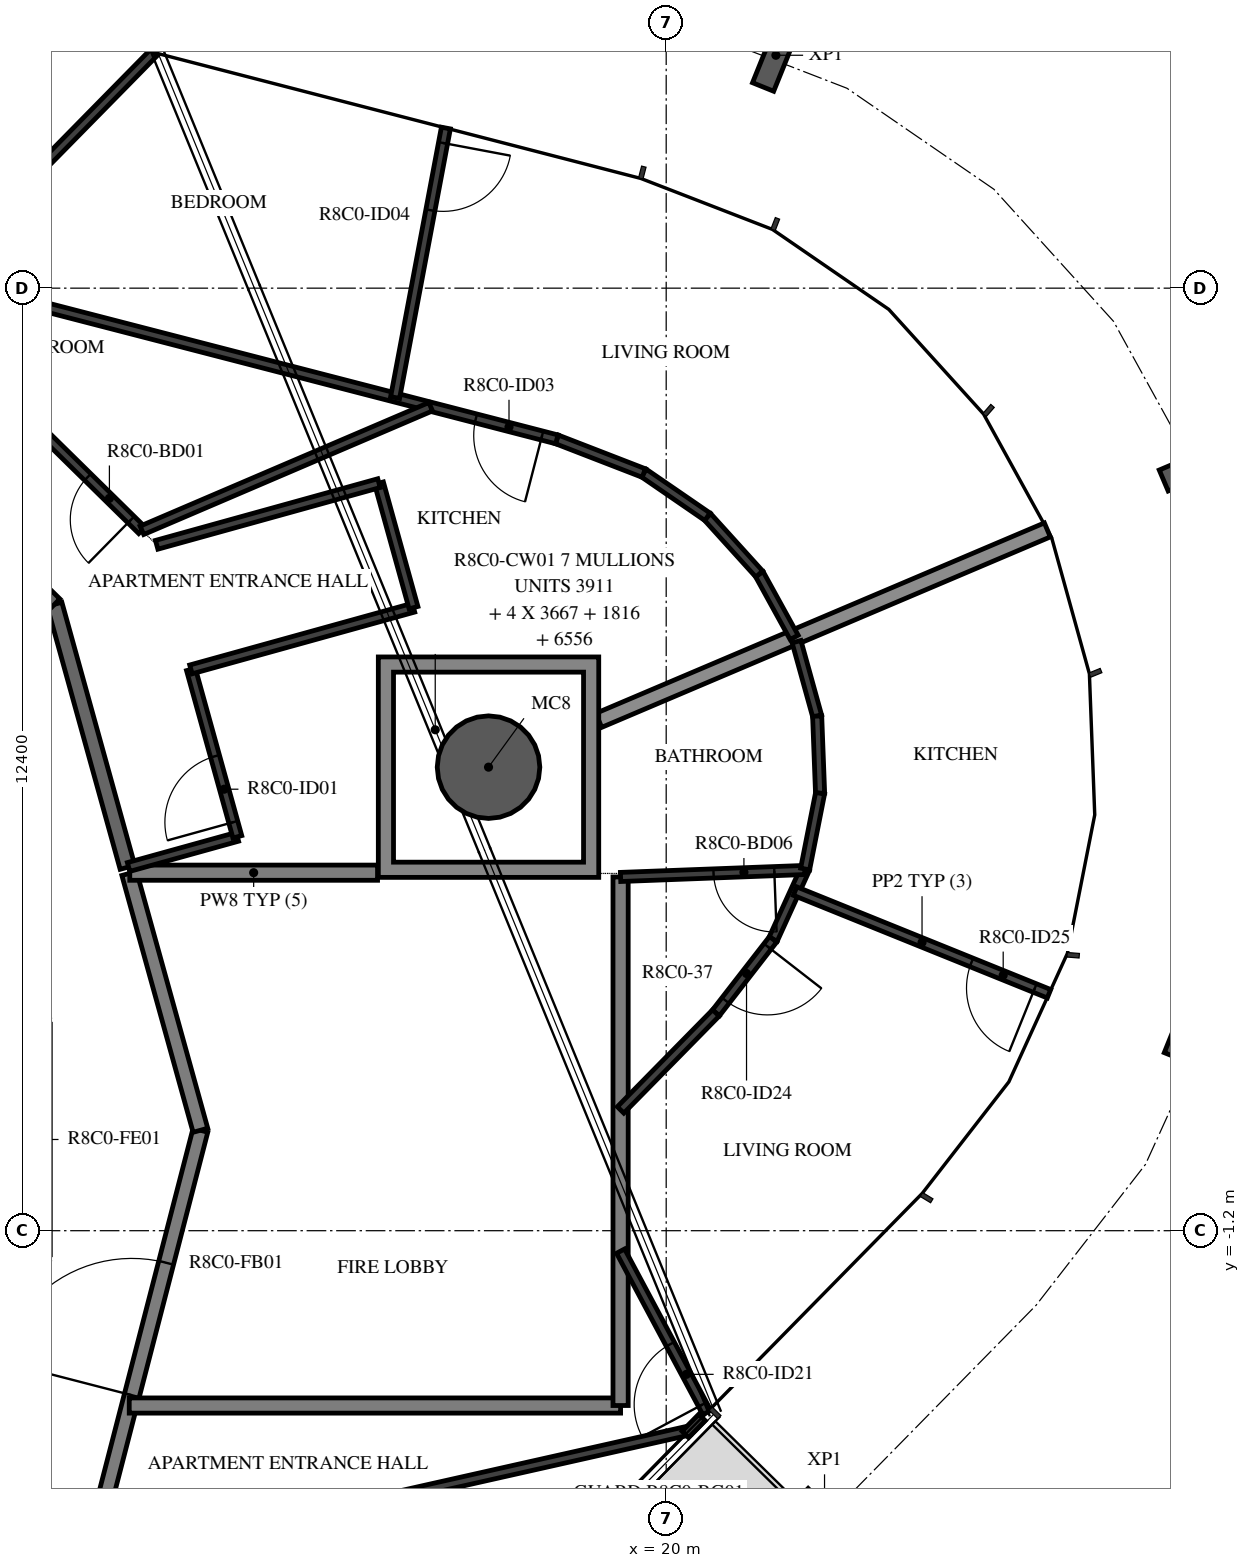
"""IFC4 building model, lengths in metres.
Left out: names, types, materials, properties, quantities, classifications, styles, units other than length and angle.
Written with IfcOpenShell. Run it as: python <this file> out.ifc"""

import sys

from ifc_helpers import new_model, si_unit, direction, frame, frame_2d, origin, origin_2d, place, context, subcontext, project, spatial, polyline, rectangle, hollow_circle, i_section, outline, extrude, element, fill, save


model = new_model("IFC4")
c1 = context("Model", 3, precision=1e-05, world=origin(), true_north=direction((0.0, 1.0)))
c2 = subcontext(c1, "Body", "Model", "MODEL_VIEW")
j1 = project(units=[si_unit("LENGTHUNIT", "METRE"), si_unit("PLANEANGLEUNIT", "RADIAN")], contexts=[c1])
p1 = place(None, origin())
s1 = spatial("IfcSite", under=j1, at=p1, CompositionType="ELEMENT")
p2 = place(p1, origin())
s2 = spatial("IfcBuilding", under=s1, at=p2, CompositionType="ELEMENT")
p3 = place(p2, frame((0.0, 0.0, 319.2)))
s3 = spatial("IfcBuildingStorey", under=s2, at=p3, CompositionType="ELEMENT", Elevation=319.2)
p4 = place(p3, frame((17.663, 4.898, -0.38), z_axis=(0.0, 0.0, 1.0), x_axis=(1.0, 0.0, 0.0)))
e1 = element("IfcColumn", 1, at=p4, inside=s3, PredefinedType="COLUMN", context=c2, shape_type="SweptSolid", body=[
    extrude(hollow_circle(Radius=0.675, WallThickness=0.03, at=origin_2d()), origin(), (0.0, 0.0, 1.0), 3.5),
])
for number, where, z_axis, x_axis in (
    (2, (22.083, -5.013, -0.38), (0.0, 0.0, 1.0), (-0.701, -0.713, 0.0)),
    (3, (27.026, 1.113, -0.38), (0.0, 0.0, 1.0), (-0.375, -0.927, 0.0)),
    (4, (26.96, 8.845, -0.38), (0.0, 0.0, 1.0), (0.391, -0.92, 0.0)),
    (5, (21.443, 14.264, -0.38), (0.0, 0.0, 1.0), (0.927, -0.374, 0.0)),
):
    element("IfcColumn", number, at=place(p3, frame(where, z_axis=z_axis, x_axis=x_axis)), inside=s3, PredefinedType="COLUMN", context=c2, shape_type="SweptSolid", body=[
        extrude(i_section(OverallWidth=0.3, OverallDepth=0.9, WebThickness=0.019, FlangeThickness=0.035, FilletRadius=0.03, at=origin_2d()), origin(), (0.0, 0.0, 1.0), 3.5),
    ])
p5 = place(p3, frame((12.074, -6.831, 0.0), z_axis=(0.0, 0.0, 1.0), x_axis=(0.250391063186, 0.968144780225, 0.0)))
e6 = element("IfcWall", 6, at=p5, inside=s3, PredefinedType="STANDARD", context=c2, shape_type="SweptSolid", body=[
    extrude(rectangle(XDim=7.181, YDim=0.2, at=frame_2d((3.591, 0.0))), origin(), (0.0, 0.0, 1.0), 3.12),
])
p6 = place(p5, frame((3.581, 0.0, 0.0)))
e7 = element("IfcOpeningElement", 7, at=p6, cuts=e6, PredefinedType="OPENING", context=c2, shape_type="SweptSolid", body=[
    extrude(rectangle(XDim=1.8, YDim=2.1, at=frame_2d((0.9, 1.05))), frame((0.0, 0.11, 0.0), z_axis=(0.0, -1.0, 0.0), x_axis=(1.0, 0.0, 0.0)), (0.0, 0.0, 1.0), 0.22),
])
p7 = place(p3, frame((13.872, 0.121, 0.0), z_axis=(0.0, 0.0, 1.0), x_axis=(-0.267291928416, 0.963615600228, 0.0)))
e8 = element("IfcWall", 8, at=p7, inside=s3, PredefinedType="STANDARD", context=c2, shape_type="SweptSolid", body=[
    extrude(rectangle(XDim=3.507, YDim=0.2, at=frame_2d((1.753, 0.0))), origin(), (0.0, 0.0, 1.0), 3.12),
])
p8 = place(p3, frame((12.913, 3.581, 0.0), z_axis=(0.0, 0.0, 1.0), x_axis=(-0.267223005422, 0.963634715737, 0.0)))
e9 = element("IfcWall", 9, at=p8, inside=s3, PredefinedType="STANDARD", context=c2, shape_type="SweptSolid", body=[
    extrude(rectangle(XDim=3.591, YDim=0.2, at=frame_2d((1.795, 0.0))), origin(), (0.0, 0.0, 1.0), 3.12),
])
p9 = place(p3, frame((11.953, 7.041, 0.0), z_axis=(0.0, 0.0, 1.0), x_axis=(-0.713250549143, 0.70090916255, 0.0)))
e10 = element("IfcWall", 10, at=p9, inside=s3, PredefinedType="STANDARD", context=c2, shape_type="SweptSolid", body=[
    extrude(rectangle(XDim=7.181, YDim=0.2, at=frame_2d((3.59, 0.0))), origin(), (0.0, 0.0, 1.0), 3.12),
])
p10 = place(p9, frame((2.6, 0.0, 0.0)))
e11 = element("IfcOpeningElement", 11, at=p10, cuts=e10, PredefinedType="OPENING", context=c2, shape_type="SweptSolid", body=[
    extrude(rectangle(XDim=1.0, YDim=2.1, at=frame_2d((0.5, 1.05))), frame((0.0, 0.11, 0.0), z_axis=(0.0, -1.0, 0.0), x_axis=(1.0, 0.0, 0.0)), (0.0, 0.0, 1.0), 0.22),
])
p11 = place(p3, frame((16.203, 3.51, 0.0), z_axis=(0.0, 0.0, 1.0), x_axis=(-1.0, 0.0, 0.0)))
e12 = element("IfcWall", 12, at=p11, inside=s3, PredefinedType="STANDARD", context=c2, shape_type="SweptSolid", body=[
    extrude(rectangle(XDim=3.26, YDim=0.2, at=frame_2d((1.63, 0.0))), origin(), (0.0, 0.0, 1.0), 3.12),
])
p12 = place(p3, frame((12.936, -3.5, 0.0), z_axis=(0.0, 0.0, 1.0), x_axis=(1.0, 0.0, 0.0)))
e13 = element("IfcWall", 13, at=p12, inside=s3, PredefinedType="STANDARD", context=c2, shape_type="SweptSolid", body=[
    extrude(rectangle(XDim=6.464, YDim=0.2, at=frame_2d((3.232, 0.0))), origin(), (0.0, 0.0, 1.0), 3.12),
])
p13 = place(p3, frame((19.4, -3.5, 0.0), z_axis=(0.0, 0.0, 1.0), x_axis=(0.0, 1.0, 0.0)))
e14 = element("IfcWall", 14, at=p13, inside=s3, PredefinedType="STANDARD", context=c2, shape_type="SweptSolid", body=[
    extrude(rectangle(XDim=6.954, YDim=0.2, at=frame_2d((3.477, 0.0))), origin(), (0.0, 0.0, 1.0), 3.12),
])
p14 = place(p3, frame((19.113, 5.514, 0.0), z_axis=(0.0, 0.0, 1.0), x_axis=(0.920500452946, 0.390741495269, 0.0)))
e15 = element("IfcWall", 15, at=p14, inside=s3, PredefinedType="STANDARD", context=c2, shape_type="SweptSolid", body=[
    extrude(rectangle(XDim=6.412, YDim=0.2, at=frame_2d((3.206, 0.0))), origin(), (0.0, 0.0, 1.0), 2.73),
])
p15 = place(p3, frame((12.927, 3.585, 0.0), z_axis=(0.0, 0.0, 1.0), x_axis=(0.963616756608, 0.26728775951, 0.0)))
e16 = element("IfcWall", 16, at=p15, inside=s3, PredefinedType="PARTITIONING", context=c2, shape_type="SweptSolid", body=[
    extrude(rectangle(XDim=1.485, YDim=0.12, at=frame_2d((0.743, 0.0))), origin(), (0.0, 0.0, 1.0), 3.12),
])
p16 = place(p3, frame((14.358, 3.982, 0.0), z_axis=(0.0, 0.0, 1.0), x_axis=(-0.267263698345, 0.963623430364, 0.0)))
e17 = element("IfcWall", 17, at=p16, inside=s3, PredefinedType="PARTITIONING", context=c2, shape_type="SweptSolid", body=[
    extrude(rectangle(XDim=2.286, YDim=0.12, at=frame_2d((1.143, 0.0))), origin(), (0.0, 0.0, 1.0), 3.12),
])
p17 = place(p16, frame((0.2, 0.0, 0.0)))
e18 = element("IfcOpeningElement", 18, at=p17, cuts=e17, PredefinedType="OPENING", context=c2, shape_type="SweptSolid", body=[
    extrude(rectangle(XDim=0.9, YDim=2.1, at=frame_2d((0.45, 1.05))), frame((0.0, 0.07, 0.0), z_axis=(0.0, -1.0, 0.0), x_axis=(1.0, 0.0, 0.0)), (0.0, 0.0, 1.0), 0.14),
])
p18 = place(p3, frame((13.747, 6.184, 0.0), z_axis=(0.0, 0.0, 1.0), x_axis=(0.963620272151, 0.267275085073, 0.0)))
e19 = element("IfcWall", 19, at=p18, inside=s3, PredefinedType="PARTITIONING", context=c2, shape_type="SweptSolid", body=[
    extrude(rectangle(XDim=3.039, YDim=0.12, at=frame_2d((1.52, 0.0))), origin(), (0.0, 0.0, 1.0), 3.12),
])
p19 = place(p3, frame((16.676, 6.997, 0.0), z_axis=(0.0, 0.0, 1.0), x_axis=(-0.267258687102, 0.963624820233, 0.0)))
e20 = element("IfcWall", 20, at=p19, inside=s3, PredefinedType="PARTITIONING", context=c2, shape_type="SweptSolid", body=[
    extrude(rectangle(XDim=1.7, YDim=0.12, at=frame_2d((0.85, 0.0))), origin(), (0.0, 0.0, 1.0), 3.12),
])
p20 = place(p3, frame((16.221, 8.635, 0.0), z_axis=(0.0, 0.0, 1.0), x_axis=(-0.963616947452, -0.267287071484, 0.0)))
e21 = element("IfcWall", 21, at=p20, inside=s3, PredefinedType="PARTITIONING", context=c2, shape_type="SweptSolid", body=[
    extrude(rectangle(XDim=3.035, YDim=0.12, at=frame_2d((1.518, 0.0))), origin(), (0.0, 0.0, 1.0), 3.12),
])
p21 = place(p3, frame((13.103, 8.014, 0.0), z_axis=(0.0, 0.0, 1.0), x_axis=(-0.713261822754, 0.700897690253, 0.0)))
e22 = element("IfcWall", 22, at=p21, inside=s3, PredefinedType="PARTITIONING", context=c2, shape_type="SweptSolid", body=[
    extrude(rectangle(XDim=7.721, YDim=0.12, at=frame_2d((3.86, 0.0))), origin(), (0.0, 0.0, 1.0), 3.12),
])
p22 = place(p21, frame((0.2, 0.0, 0.0)))
e23 = element("IfcOpeningElement", 23, at=p22, cuts=e22, PredefinedType="OPENING", context=c2, shape_type="SweptSolid", body=[
    extrude(rectangle(XDim=0.8, YDim=2.1, at=frame_2d((0.4, 1.05))), frame((0.0, 0.07, 0.0), z_axis=(0.0, -1.0, 0.0), x_axis=(1.0, 0.0, 0.0)), (0.0, 0.0, 1.0), 0.14),
])
p23 = place(p21, frame((5.25, 0.0, 0.0)))
e24 = element("IfcOpeningElement", 24, at=p23, cuts=e22, PredefinedType="OPENING", context=c2, shape_type="SweptSolid", body=[
    extrude(rectangle(XDim=0.9, YDim=2.1, at=frame_2d((0.45, 1.05))), frame((0.0, 0.07, 0.0), z_axis=(0.0, -1.0, 0.0), x_axis=(1.0, 0.0, 0.0)), (0.0, 0.0, 1.0), 0.14),
])
p24 = place(p3, frame((21.684, 6.605, 0.0), z_axis=(0.0, 0.0, 1.0), x_axis=(-0.482263369205, 0.876026279699, 0.0)))
e25 = element("IfcWall", 25, at=p24, inside=s3, PredefinedType="PARTITIONING", context=c2, shape_type="SweptSolid", body=[
    extrude(rectangle(XDim=0.952, YDim=0.12, at=frame_2d((0.476, 0.0))), origin(), (0.0, 0.0, 1.0), 3.12),
])
for number, where, z_axis, x_axis in (
    (26, (21.225, 7.439, 0.0), (0.0, 0.0, 1.0), (-0.671, 0.741, 0.0)),
    (27, (20.543, 8.192, 0.0), (0.0, 0.0, 1.0), (-0.824, 0.566, 0.0)),
):
    element("IfcWall", number, at=place(p3, frame(where, z_axis=z_axis, x_axis=x_axis)), inside=s3, PredefinedType="PARTITIONING", context=c2, shape_type="SweptSolid", body=[
        extrude(rectangle(XDim=1.016, YDim=0.12, at=frame_2d((0.508, 0.0))), origin(), (0.0, 0.0, 1.0), 3.12),
    ])
p25 = place(p3, frame((19.706, 8.768, 0.0), z_axis=(0.0, 0.0, 1.0), x_axis=(-0.932522717361, 0.361111314702, 0.0)))
e28 = element("IfcWall", 28, at=p25, inside=s3, PredefinedType="PARTITIONING", context=c2, shape_type="SweptSolid", body=[
    extrude(rectangle(XDim=1.227, YDim=0.12, at=frame_2d((0.614, 0.0))), origin(), (0.0, 0.0, 1.0), 3.12),
])
p26 = place(p3, frame((18.561, 9.211, 0.0), z_axis=(0.0, 0.0, 1.0), x_axis=(-0.968146475492, 0.250384508293, 0.0)))
e29 = element("IfcWall", 29, at=p26, inside=s3, PredefinedType="PARTITIONING", context=c2, shape_type="SweptSolid", body=[
    extrude(rectangle(XDim=9.359, YDim=0.12, at=frame_2d((4.679, 0.0))), origin(), (0.0, 0.0, 1.0), 3.12),
])
p27 = place(p26, frame((0.2, 0.0, 0.0)))
e30 = element("IfcOpeningElement", 30, at=p27, cuts=e29, PredefinedType="OPENING", context=c2, shape_type="SweptSolid", body=[
    extrude(rectangle(XDim=0.9, YDim=2.1, at=frame_2d((0.45, 1.05))), frame((0.0, 0.07, 0.0), z_axis=(0.0, -1.0, 0.0), x_axis=(1.0, 0.0, 0.0)), (0.0, 0.0, 1.0), 0.14),
])
p28 = place(p3, frame((16.902, 9.64, 0.0), z_axis=(0.0, 0.0, 1.0), x_axis=(-0.919371033545, -0.393391538647, 0.0)))
e31 = element("IfcWall", 31, at=p28, inside=s3, PredefinedType="PARTITIONING", context=c2, shape_type="SweptSolid", body=[
    extrude(rectangle(XDim=4.132, YDim=0.12, at=frame_2d((2.066, 0.0))), origin(), (0.0, 0.0, 1.0), 3.12),
])
p29 = place(p3, frame((17.102, 13.307, 0.0), z_axis=(0.0, 0.0, 1.0), x_axis=(-0.185134164105, -0.982713254862, 0.0)))
e32 = element("IfcWall", 32, at=p29, inside=s3, PredefinedType="PARTITIONING", context=c2, shape_type="SweptSolid", body=[
    extrude(rectangle(XDim=3.608, YDim=0.12, at=frame_2d((1.804, 0.0))), origin(), (0.0, 0.0, 1.0), 3.12),
])
p30 = place(p29, frame((0.2, 0.0, 0.0)))
e33 = element("IfcOpeningElement", 33, at=p30, cuts=e32, PredefinedType="OPENING", context=c2, shape_type="SweptSolid", body=[
    extrude(rectangle(XDim=0.9, YDim=2.1, at=frame_2d((0.45, 1.05))), frame((0.0, 0.07, 0.0), z_axis=(0.0, -1.0, 0.0), x_axis=(1.0, 0.0, 0.0)), (0.0, 0.0, 1.0), 0.14),
])
p31 = place(p3, frame((13.26, 14.3, 0.0), z_axis=(0.0, 0.0, 1.0), x_axis=(-0.700942858884, -0.713217434293, 0.0)))
e34 = element("IfcWall", 34, at=p31, inside=s3, PredefinedType="PARTITIONING", context=c2, shape_type="SweptSolid", body=[
    extrude(rectangle(XDim=4.157, YDim=0.12, at=frame_2d((2.079, 0.0))), origin(), (0.0, 0.0, 1.0), 3.12),
])
p32 = place(p3, frame((20.535, -3.593, 0.0), z_axis=(0.0, 0.0, 1.0), x_axis=(-0.471340561072, 0.881951288614, 0.0)))
e35 = element("IfcWall", 35, at=p32, inside=s3, PredefinedType="PARTITIONING", context=c2, shape_type="SweptSolid", body=[
    extrude(rectangle(XDim=2.408, YDim=0.12, at=frame_2d((1.204, 0.0))), origin(), (0.0, 0.0, 1.0), 3.12),
])
p33 = place(p32, frame((0.12, 0.0, 0.0)))
e36 = element("IfcOpeningElement", 36, at=p33, cuts=e35, PredefinedType="OPENING", context=c2, shape_type="SweptSolid", body=[
    extrude(rectangle(XDim=0.9, YDim=2.1, at=frame_2d((0.45, 1.05))), frame((0.0, 0.07, 0.0), z_axis=(0.0, -1.0, 0.0), x_axis=(1.0, 0.0, 0.0)), (0.0, 0.0, 1.0), 0.14),
])
p34 = place(p3, frame((14.036, -5.237, 0.0), z_axis=(0.0, 0.0, 1.0), x_axis=(0.975645756324, 0.219352132805, 0.0)))
e37 = element("IfcWall", 37, at=p34, inside=s3, PredefinedType="PARTITIONING", context=c2, shape_type="SweptSolid", body=[
    extrude(rectangle(XDim=6.424, YDim=0.12, at=frame_2d((3.212, 0.0))), origin(), (0.0, 0.0, 1.0), 3.12),
])
p35 = place(p3, frame((20.471, -3.657, 0.0), z_axis=(0.0, 0.0, 1.0), x_axis=(-0.700842635321, -0.713315919153, 0.0)))
e38 = element("IfcWall", 38, at=p35, inside=s3, PredefinedType="PARTITIONING", context=c2, shape_type="SweptSolid", body=[
    extrude(rectangle(XDim=0.313, YDim=0.12, at=frame_2d((0.157, 0.0))), origin(), (0.0, 0.0, 1.0), 3.12),
])
p36 = place(p3, frame((21.828, 3.558, 0.0), z_axis=(0.0, 0.0, 1.0), x_axis=(-0.414726005229, -0.909946339399, 0.0)))
e39 = element("IfcWall", 39, at=p36, inside=s3, PredefinedType="PARTITIONING", context=c2, shape_type="SweptSolid", body=[
    extrude(rectangle(XDim=1.016, YDim=0.12, at=frame_2d((0.508, 0.0))), origin(), (0.0, 0.0, 1.0), 3.12),
])
p37 = place(p3, frame((21.406, 2.634, 0.0), z_axis=(0.0, 0.0, 1.0), x_axis=(-0.613444581667, -0.789737769911, 0.0)))
e40 = element("IfcWall", 40, at=p37, inside=s3, PredefinedType="PARTITIONING", context=c2, shape_type="SweptSolid", body=[
    extrude(rectangle(XDim=1.227, YDim=0.12, at=frame_2d((0.614, 0.0))), origin(), (0.0, 0.0, 1.0), 3.12),
])
p38 = place(p37, frame((0.12, 0.0, 0.0)))
e41 = element("IfcOpeningElement", 41, at=p38, cuts=e40, PredefinedType="OPENING", context=c2, shape_type="SweptSolid", body=[
    extrude(rectangle(XDim=0.9, YDim=2.1, at=frame_2d((0.45, 1.05))), frame((0.0, 0.07, 0.0), z_axis=(0.0, -1.0, 0.0), x_axis=(1.0, 0.0, 0.0)), (0.0, 0.0, 1.0), 0.14),
])
p39 = place(p3, frame((20.654, 1.665, 0.0), z_axis=(0.0, 0.0, 1.0), x_axis=(-0.700870484553, -0.713288555833, 0.0)))
e42 = element("IfcWall", 42, at=p39, inside=s3, PredefinedType="PARTITIONING", context=c2, shape_type="SweptSolid", body=[
    extrude(rectangle(XDim=1.789, YDim=0.12, at=frame_2d((0.895, 0.0))), origin(), (0.0, 0.0, 1.0), 3.12),
])
p40 = place(p3, frame((25.036, 1.917, 0.0), z_axis=(0.0, 0.0, 1.0), x_axis=(-0.927096540393, 0.374822631108, 0.0)))
e43 = element("IfcWall", 43, at=p40, inside=s3, PredefinedType="PARTITIONING", context=c2, shape_type="SweptSolid", body=[
    extrude(rectangle(XDim=3.603, YDim=0.12, at=frame_2d((1.802, 0.0))), origin(), (0.0, 0.0, 1.0), 2.73),
])
p41 = place(p40, frame((0.2, 0.0, 0.0)))
e44 = element("IfcOpeningElement", 44, at=p41, cuts=e43, PredefinedType="OPENING", context=c2, shape_type="SweptSolid", body=[
    extrude(rectangle(XDim=0.9, YDim=2.1, at=frame_2d((0.45, 1.05))), frame((0.0, 0.07, 0.0), z_axis=(0.0, -1.0, 0.0), x_axis=(1.0, 0.0, 0.0)), (0.0, 0.0, 1.0), 0.14),
])
p42 = place(p3, frame((21.822, 3.545, 0.0), z_axis=(0.0, 0.0, 1.0), x_axis=(-0.999286397149, -0.037771635816, 0.0)))
e45 = element("IfcWall", 45, at=p42, inside=s3, PredefinedType="PARTITIONING", context=c2, shape_type="SweptSolid", body=[
    extrude(rectangle(XDim=2.424, YDim=0.12, at=frame_2d((1.212, 0.0))), origin(), (0.0, 0.0, 1.0), 3.12),
])
p43 = place(p42, frame((0.4, 0.0, 0.0)))
e46 = element("IfcOpeningElement", 46, at=p43, cuts=e45, PredefinedType="OPENING", context=c2, shape_type="SweptSolid", body=[
    extrude(rectangle(XDim=0.8, YDim=2.1, at=frame_2d((0.4, 1.05))), frame((0.0, 0.07, 0.0), z_axis=(0.0, -1.0, 0.0), x_axis=(1.0, 0.0, 0.0)), (0.0, 0.0, 1.0), 0.14),
])
for number, where, z_axis, x_axis in (
    (47, (21.715, 6.549, 0.0), (0.0, 0.0, 1.0), (0.267, -0.964, 0.0)),
    (48, (21.986, 5.57, 0.0), (0.0, 0.0, 1.0), (0.038, -0.999, 0.0)),
    (49, (22.025, 4.555, 0.0), (0.0, 0.0, 1.0), (-0.194, -0.981, 0.0)),
):
    element("IfcWall", number, at=place(p3, frame(where, z_axis=z_axis, x_axis=x_axis)), inside=s3, PredefinedType="PARTITIONING", context=c2, shape_type="SweptSolid", body=[
        extrude(rectangle(XDim=1.016, YDim=0.12, at=frame_2d((0.508, 0.0))), origin(), (0.0, 0.0, 1.0), 3.12),
    ])
p44 = place(p3, origin())
e50 = element("IfcWall", 50, at=p44, inside=s3, PredefinedType="STANDARD", context=c2, shape_type="SweptSolid", body=[
    extrude(outline(polyline([(19.113, 6.348), (19.113, 3.448), (16.213, 3.448), (16.213, 6.348), (19.113, 6.348)]), holes=[polyline([(16.413, 3.648), (18.913, 3.648), (18.913, 6.148), (16.413, 6.148), (16.413, 3.648)])]), origin(), (0.0, 0.0, 1.0), 3.12),
])
p45 = place(p17, origin())
e51 = element("IfcDoor", 51, at=p45, inside=s3, OperationType="SINGLE_SWING_LEFT", PredefinedType="DOOR", context=c2, shape_type="SweptSolid", body=[
    extrude(rectangle(XDim=0.9, YDim=2.1, at=frame_2d((0.45, 1.05))), frame((0.0, 0.025, 0.0), z_axis=(0.0, -1.0, 0.0), x_axis=(1.0, 0.0, 0.0)), (0.0, 0.0, 1.0), 0.05),
])
fill(e18, e51)
p46 = place(p22, origin())
e52 = element("IfcDoor", 52, at=p46, inside=s3, OperationType="SINGLE_SWING_LEFT", PredefinedType="DOOR", context=c2, shape_type="SweptSolid", body=[
    extrude(rectangle(XDim=0.8, YDim=2.1, at=frame_2d((0.4, 1.05))), frame((0.0, 0.025, 0.0), z_axis=(0.0, -1.0, 0.0), x_axis=(1.0, 0.0, 0.0)), (0.0, 0.0, 1.0), 0.05),
])
fill(e23, e52)
p47 = place(p27, origin())
e53 = element("IfcDoor", 53, at=p47, inside=s3, OperationType="SINGLE_SWING_LEFT", PredefinedType="DOOR", context=c2, shape_type="SweptSolid", body=[
    extrude(rectangle(XDim=0.9, YDim=2.1, at=frame_2d((0.45, 1.05))), frame((0.0, 0.025, 0.0), z_axis=(0.0, -1.0, 0.0), x_axis=(1.0, 0.0, 0.0)), (0.0, 0.0, 1.0), 0.05),
])
fill(e30, e53)
p48 = place(p30, origin())
e54 = element("IfcDoor", 54, at=p48, inside=s3, OperationType="SINGLE_SWING_RIGHT", PredefinedType="DOOR", context=c2, shape_type="SweptSolid", body=[
    extrude(rectangle(XDim=0.9, YDim=2.1, at=frame_2d((0.45, 1.05))), frame((0.0, 0.025, 0.0), z_axis=(0.0, -1.0, 0.0), x_axis=(1.0, 0.0, 0.0)), (0.0, 0.0, 1.0), 0.05),
])
fill(e33, e54)
p49 = place(p33, origin())
e55 = element("IfcDoor", 55, at=p49, inside=s3, OperationType="SINGLE_SWING_RIGHT", PredefinedType="DOOR", context=c2, shape_type="SweptSolid", body=[
    extrude(rectangle(XDim=0.9, YDim=2.1, at=frame_2d((0.45, 1.05))), frame((0.0, 0.025, 0.0), z_axis=(0.0, -1.0, 0.0), x_axis=(1.0, 0.0, 0.0)), (0.0, 0.0, 1.0), 0.05),
])
fill(e36, e55)
p50 = place(p38, origin())
e56 = element("IfcDoor", 56, at=p50, inside=s3, OperationType="SINGLE_SWING_RIGHT", PredefinedType="DOOR", context=c2, shape_type="SweptSolid", body=[
    extrude(rectangle(XDim=0.9, YDim=2.1, at=frame_2d((0.45, 1.05))), frame((0.0, 0.025, 0.0), z_axis=(0.0, -1.0, 0.0), x_axis=(1.0, 0.0, 0.0)), (0.0, 0.0, 1.0), 0.05),
])
fill(e41, e56)
p51 = place(p43, origin())
e57 = element("IfcDoor", 57, at=p51, inside=s3, OperationType="SINGLE_SWING_RIGHT", PredefinedType="DOOR", context=c2, shape_type="SweptSolid", body=[
    extrude(rectangle(XDim=0.8, YDim=2.1, at=frame_2d((0.4, 1.05))), frame((0.0, 0.025, 0.0), z_axis=(0.0, -1.0, 0.0), x_axis=(1.0, 0.0, 0.0)), (0.0, 0.0, 1.0), 0.05),
])
fill(e46, e57)
p52 = place(p41, origin())
e58 = element("IfcDoor", 58, at=p52, inside=s3, OperationType="SINGLE_SWING_RIGHT", PredefinedType="DOOR", context=c2, shape_type="SweptSolid", body=[
    extrude(rectangle(XDim=0.9, YDim=2.1, at=frame_2d((0.45, 1.05))), frame((0.0, 0.025, 0.0), z_axis=(0.0, -1.0, 0.0), x_axis=(1.0, 0.0, 0.0)), (0.0, 0.0, 1.0), 0.05),
])
fill(e44, e58)
p53 = place(p6, origin())
e59 = element("IfcDoor", 59, at=p53, inside=s3, OperationType="DOUBLE_DOOR_SINGLE_SWING", PredefinedType="DOOR", context=c2, shape_type="SweptSolid", body=[
    extrude(rectangle(XDim=1.8, YDim=2.1, at=frame_2d((0.9, 1.05))), frame((0.0, 0.025, 0.0), z_axis=(0.0, -1.0, 0.0), x_axis=(1.0, 0.0, 0.0)), (0.0, 0.0, 1.0), 0.05),
])
fill(e7, e59)
save(model, sys.argv[1])
